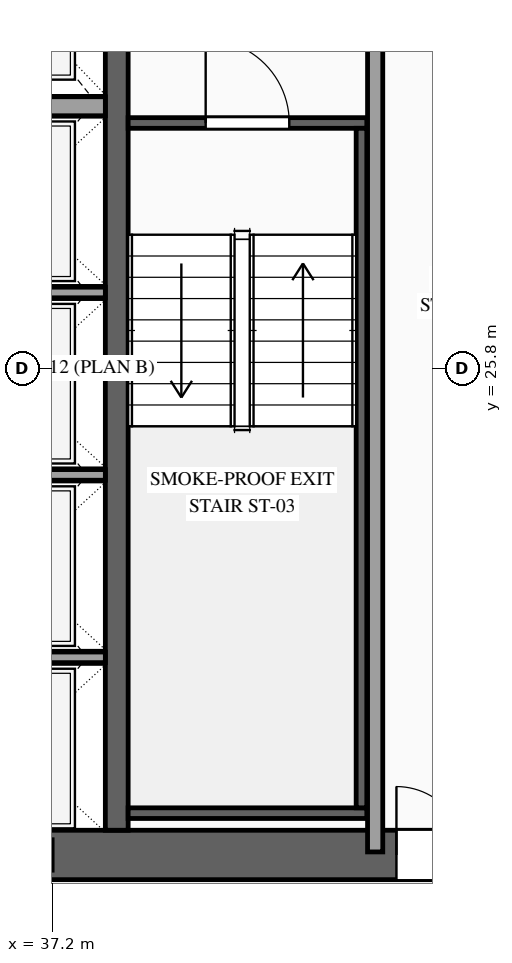
"""IFC4 building model, lengths in metres.
Left out: names, types, materials, properties, quantities, classifications, styles, units other than length and angle.
Written with IfcOpenShell. Run it as: python <this file> out.ifc"""

import sys

from ifc_helpers import new_model, si_unit, direction, frame, frame_2d, origin, place, context, subcontext, project, spatial, rectangle, extrude, source, transform, mapped, element, fill, save


model = new_model("IFC4")
c1 = context("Model", 3, precision=1e-05, world=origin(), true_north=direction((0.0, 1.0)))
c2 = subcontext(c1, "Body", "Model", "MODEL_VIEW")
j1 = project(units=[si_unit("LENGTHUNIT", "METRE"), si_unit("PLANEANGLEUNIT", "RADIAN")], contexts=[c1])
p1 = place(None, origin())
s1 = spatial("IfcSite", under=j1, at=p1, CompositionType="ELEMENT")
p2 = place(p1, origin())
s2 = spatial("IfcBuilding", under=s1, at=p2, CompositionType="ELEMENT")
p3 = place(p2, frame((0.0, 0.0, 209.0)))
s3 = spatial("IfcBuildingStorey", under=s2, at=p3, CompositionType="ELEMENT", Elevation=209.0)
p4 = place(p3, frame((23.475, 19.4, 0.0), z_axis=(0.0, 0.0, 1.0), x_axis=(1.0, 0.0, 0.0)))
e1 = element("IfcWall", 1, at=p4, inside=s3, PredefinedType="SHEAR", context=c2, shape_type="SweptSolid", body=[
    extrude(rectangle(XDim=27.05, YDim=0.65, at=frame_2d((13.525, 0.0))), origin(), (0.0, 0.0, 1.0), 3.5),
])
p5 = place(p4, frame((1.975, 0.0, 0.0)))
e2 = element("IfcOpeningElement", 2, at=p5, cuts=e1, PredefinedType="OPENING", context=c2, shape_type="SweptSolid", body=[
    extrude(rectangle(XDim=1.1, YDim=2.2, at=frame_2d((0.55, 1.1))), frame((0.0, 0.34, 0.0), z_axis=(0.0, -1.0, 0.0), x_axis=(1.0, 0.0, 0.0)), (0.0, 0.0, 1.0), 0.68),
])
p6 = place(p4, frame((9.875, 0.0, 0.0)))
e3 = element("IfcOpeningElement", 3, at=p6, cuts=e1, PredefinedType="OPENING", context=c2, shape_type="SweptSolid", body=[
    extrude(rectangle(XDim=1.1, YDim=2.2, at=frame_2d((0.55, 1.1))), frame((0.0, 0.34, 0.0), z_axis=(0.0, -1.0, 0.0), x_axis=(1.0, 0.0, 0.0)), (0.0, 0.0, 1.0), 0.68),
])
p7 = place(p4, frame((23.075, 0.0, 0.0)))
e4 = element("IfcOpeningElement", 4, at=p7, cuts=e1, PredefinedType="OPENING", context=c2, shape_type="SweptSolid", body=[
    extrude(rectangle(XDim=1.1, YDim=2.2, at=frame_2d((0.55, 1.1))), frame((0.0, 0.34, 0.0), z_axis=(0.0, -1.0, 0.0), x_axis=(1.0, 0.0, 0.0)), (0.0, 0.0, 1.0), 0.68),
])
p8 = place(p4, frame((19.695, 0.0, 0.0)))
e5 = element("IfcOpeningElement", 5, at=p8, cuts=e1, PredefinedType="OPENING", context=c2, shape_type="SweptSolid", body=[
    extrude(rectangle(XDim=0.9, YDim=2.15, at=frame_2d((0.45, 1.075))), frame((0.0, 0.34, 0.0), z_axis=(0.0, -1.0, 0.0), x_axis=(1.0, 0.0, 0.0)), (0.0, 0.0, 1.0), 0.68),
])
p9 = place(p4, frame((18.255, 0.0, 0.0)))
e6 = element("IfcOpeningElement", 6, at=p9, cuts=e1, PredefinedType="OPENING", context=c2, shape_type="SweptSolid", body=[
    extrude(rectangle(XDim=0.9, YDim=2.15, at=frame_2d((0.45, 1.075))), frame((0.0, 0.34, 0.0), z_axis=(0.0, -1.0, 0.0), x_axis=(1.0, 0.0, 0.0)), (0.0, 0.0, 1.0), 0.68),
])
m1 = source(origin(), c2, "Body", "SweptSolid", [
    extrude(rectangle(XDim=12.15, YDim=0.3, at=frame_2d((6.075, 0.0))), origin(), (0.0, 0.0, 1.0), 3.5),
])
p10 = place(p3, frame((38.05, 19.725, 0.0), z_axis=(0.0, 0.0, 1.0), x_axis=(0.0, 1.0, 0.0)))
e7 = element("IfcWall", 7, at=p10, inside=s3, PredefinedType="SOLIDWALL", context=c2, shape_type="MappedRepresentation", body=[
    mapped(m1, transform((0.0, 0.0, 0.0), scale=1.0)),
])
m2 = source(origin(), c2, "Body", "SweptSolid", [
    extrude(rectangle(XDim=2.4, YDim=0.14, at=frame_2d((1.2, 0.0))), origin(), (0.0, 0.0, 1.0), 3.28),
])
for number, where, z_axis, x_axis in (
    (8, (35.5, 22.0, 0.0), (0.0, 0.0, 1.0), (1.0, 0.0, 0.0)),
    (9, (35.5, 24.4, 0.0), (0.0, 0.0, 1.0), (1.0, 0.0, 0.0)),
    (10, (35.5, 26.8, 0.0), (0.0, 0.0, 1.0), (1.0, 0.0, 0.0)),
):
    element("IfcWall", number, at=place(p3, frame(where, z_axis=z_axis, x_axis=x_axis)), inside=s3, PredefinedType="SOLIDWALL", context=c2, shape_type="MappedRepresentation", body=[
        mapped(m2, transform((0.0, 0.0, 0.0), scale=1.0)),
    ])
m3 = source(origin(), c2, "Body", "SweptSolid", [
    extrude(rectangle(XDim=2.4, YDim=0.25, at=frame_2d((1.2, 0.0))), origin(), (0.0, 0.0, 1.0), 3.28),
])
p11 = place(p3, frame((35.5, 29.25, 0.0), z_axis=(0.0, 0.0, 1.0), x_axis=(1.0, 0.0, 0.0)))
e11 = element("IfcWall", 11, at=p11, inside=s3, PredefinedType="SOLIDWALL", context=c2, shape_type="MappedRepresentation", body=[
    mapped(m3, transform((0.0, 0.0, 0.0), scale=1.0)),
])
p12 = place(p3, frame((38.2, 29.03, 0.0), z_axis=(0.0, 0.0, 1.0), x_axis=(1.0, 0.0, 0.0)))
e12 = element("IfcWall", 12, at=p12, inside=s3, PredefinedType="SOLIDWALL", context=c2, shape_type="SweptSolid", body=[
    extrude(rectangle(XDim=3.14, YDim=0.14, at=frame_2d((1.57, 0.0))), origin(), (0.0, 0.0, 1.0), 3.28),
])
p13 = place(p12, frame((1.02, 0.0, 0.0)))
e13 = element("IfcOpeningElement", 13, at=p13, cuts=e12, PredefinedType="OPENING", context=c2, shape_type="SweptSolid", body=[
    extrude(rectangle(XDim=1.1, YDim=2.2, at=frame_2d((0.55, 1.1))), frame((0.0, 0.085, 0.0), z_axis=(0.0, -1.0, 0.0), x_axis=(1.0, 0.0, 0.0)), (0.0, 0.0, 1.0), 0.17),
])
m4 = source(origin(), c2, "Body", "SweptSolid", [
    extrude(rectangle(XDim=3.14, YDim=0.14, at=frame_2d((1.57, 0.0))), origin(), (0.0, 0.0, 1.0), 3.28),
])
p14 = place(p3, frame((38.2, 19.95, 0.0), z_axis=(0.0, 0.0, 1.0), x_axis=(1.0, 0.0, 0.0)))
e14 = element("IfcWall", 14, at=p14, inside=s3, PredefinedType="SOLIDWALL", context=c2, shape_type="MappedRepresentation", body=[
    mapped(m4, transform((0.0, 0.0, 0.0), scale=1.0)),
])
m5 = source(origin(), c2, "Body", "SweptSolid", [
    extrude(rectangle(XDim=8.94, YDim=0.14, at=frame_2d((4.47, 0.0))), origin(), (0.0, 0.0, 1.0), 3.28),
])
p15 = place(p3, frame((41.27, 20.02, 0.0), z_axis=(0.0, 0.0, 1.0), x_axis=(0.0, 1.0, 0.0)))
e15 = element("IfcWall", 15, at=p15, inside=s3, PredefinedType="SOLIDWALL", context=c2, shape_type="MappedRepresentation", body=[
    mapped(m5, transform((0.0, 0.0, 0.0), scale=1.0)),
])
m6 = source(origin(), c2, "Body", "SweptSolid", [
    extrude(rectangle(XDim=12.72, YDim=0.2, at=frame_2d((6.36, 0.0))), origin(), (0.0, 0.0, 1.0), 3.28),
])
p16 = place(p3, frame((41.45, 19.44, 0.0), z_axis=(0.0, 0.0, 1.0), x_axis=(0.0, 1.0, 0.0)))
e16 = element("IfcWall", 16, at=p16, inside=s3, PredefinedType="PARTITIONING", context=c2, shape_type="MappedRepresentation", body=[
    mapped(m6, transform((0.0, 0.0, 0.0), scale=1.0)),
])
m7 = source(origin(), c2, "Body", "SweptSolid", [
    extrude(rectangle(XDim=1.1, YDim=2.2, at=frame_2d((0.55, 1.1))), frame((0.0, 0.025, 0.0), z_axis=(0.0, -1.0, 0.0), x_axis=(1.0, 0.0, 0.0)), (0.0, 0.0, 1.0), 0.05),
])
p17 = place(p13, origin())
e17 = element("IfcDoor", 17, at=p17, inside=s3, OperationType="SINGLE_SWING_LEFT", PredefinedType="DOOR", context=c2, shape_type="MappedRepresentation", body=[
    mapped(m7, transform((0.0, 0.0, 0.0), scale=1.0)),
])
fill(e13, e17)
m8 = source(origin(), c2, "Body", "SweptSolid", [
    extrude(rectangle(XDim=0.9, YDim=2.15, at=frame_2d((0.45, 1.075))), frame((0.0, 0.025, 0.0), z_axis=(0.0, -1.0, 0.0), x_axis=(1.0, 0.0, 0.0)), (0.0, 0.0, 1.0), 0.05),
])
p18 = place(p9, origin())
e18 = element("IfcDoor", 18, at=p18, inside=s3, OperationType="SINGLE_SWING_LEFT", PredefinedType="DOOR", context=c2, shape_type="MappedRepresentation", body=[
    mapped(m8, transform((0.0, 0.0, 0.0), scale=1.0)),
])
fill(e6, e18)
save(model, sys.argv[1])
